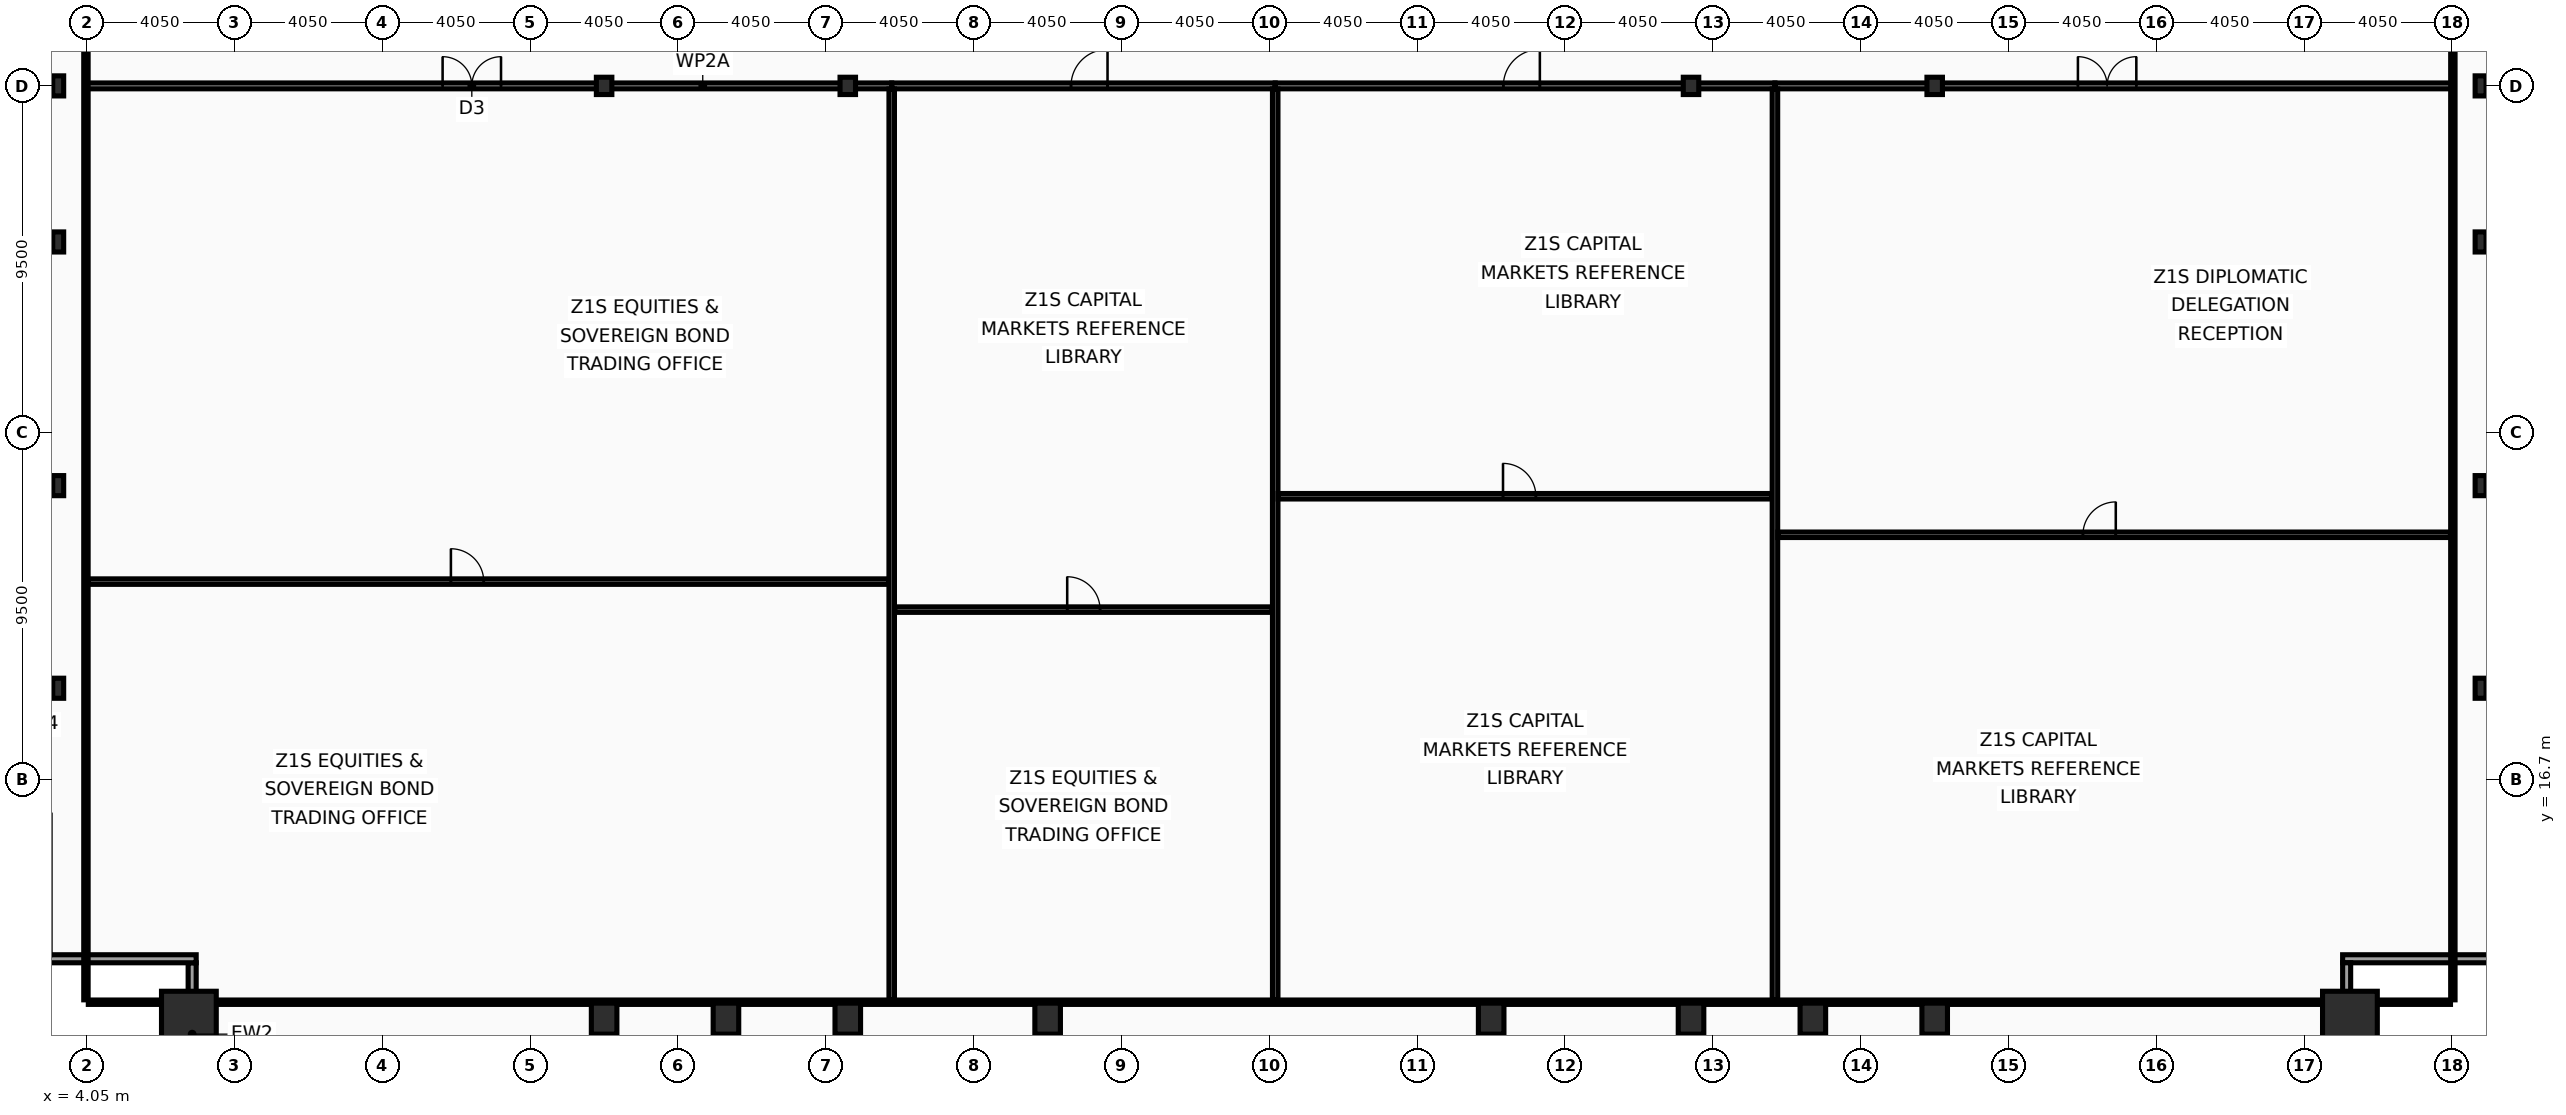
"""IFC4 building model, lengths in metres.
Left out: names, types, materials, properties, quantities, classifications, styles, units other than length and angle.
Written with IfcOpenShell. Run it as: python <this file> out.ifc"""

import sys

from ifc_helpers import new_model, si_unit, direction, frame, frame_2d, origin, origin_2d, place, context, subcontext, project, spatial, rectangle, hollow_rectangle, i_section, extrude, element, fill, save


model = new_model("IFC4")
c1 = context("Model", 3, precision=1e-05, world=origin(), true_north=direction((0.0, 1.0)))
c2 = subcontext(c1, "Body", "Model", "MODEL_VIEW")
j1 = project(units=[si_unit("LENGTHUNIT", "METRE"), si_unit("PLANEANGLEUNIT", "RADIAN")], contexts=[c1])
p1 = place(None, origin())
s1 = spatial("IfcSite", under=j1, at=p1, CompositionType="ELEMENT")
p2 = place(p1, origin())
s2 = spatial("IfcBuilding", under=s1, at=p2, CompositionType="ELEMENT")
p3 = place(p2, frame((0.0, 0.0, 90.6)))
s3 = spatial("IfcBuildingStorey", under=s2, at=p3, CompositionType="ELEMENT", Elevation=90.6)
for number, where, z_axis, x_axis in (
    (1, (6.85, 10.15, 0.0), (0.0, 0.0, 1.0), (1.0, 0.0, 0.0)),
    (2, (66.05, 10.15, 0.0), (0.0, 0.0, 1.0), (1.0, 0.0, 0.0)),
):
    element("IfcColumn", number, at=place(p3, frame(where, z_axis=z_axis, x_axis=x_axis)), inside=s3, PredefinedType="COLUMN", context=c2, shape_type="SweptSolid", body=[
        extrude(hollow_rectangle(XDim=1.5, YDim=1.5, WallThickness=0.07, at=origin_2d()), origin(), (0.0, 0.0, 1.0), 4.0),
    ])
for number, where, z_axis, x_axis in (
    (3, (18.225, 10.15, 0.0), (0.0, 0.0, 1.0), (1.0, 0.0, 0.0)),
    (4, (21.562, 10.15, 0.0), (0.0, 0.0, 1.0), (1.0, 0.0, 0.0)),
    (5, (24.9, 10.15, 0.0), (0.0, 0.0, 1.0), (1.0, 0.0, 0.0)),
    (6, (30.375, 10.15, 0.0), (0.0, 0.0, 1.0), (1.0, 0.0, 0.0)),
    (7, (42.525, 10.15, 0.0), (0.0, 0.0, 1.0), (1.0, 0.0, 0.0)),
    (8, (48.0, 10.15, 0.0), (0.0, 0.0, 1.0), (1.0, 0.0, 0.0)),
    (9, (51.337, 10.15, 0.0), (0.0, 0.0, 1.0), (1.0, 0.0, 0.0)),
    (10, (54.675, 10.15, 0.0), (0.0, 0.0, 1.0), (1.0, 0.0, 0.0)),
):
    element("IfcColumn", number, at=place(p3, frame(where, z_axis=z_axis, x_axis=x_axis)), inside=s3, PredefinedType="COLUMN", context=c2, shape_type="SweptSolid", body=[
        extrude(hollow_rectangle(XDim=0.7, YDim=0.85, WallThickness=0.05, at=origin_2d()), origin(), (0.0, 0.0, 1.0), 4.0),
    ])
for number, where, z_axis, x_axis in (
    (11, (3.27, 19.2, 0.0), (0.0, 0.0, 1.0), (1.0, 0.0, 0.0)),
    (12, (3.27, 24.75, 0.0), (0.0, 0.0, 1.0), (1.0, 0.0, 0.0)),
    (13, (3.27, 31.425, 0.0), (0.0, 0.0, 1.0), (1.0, 0.0, 0.0)),
    (14, (3.27, 35.7, 0.0), (0.0, 0.0, 1.0), (1.0, 0.0, 0.0)),
    (15, (69.63, 19.2, 0.0), (0.0, 0.0, 1.0), (1.0, 0.0, 0.0)),
    (16, (69.63, 24.75, 0.0), (0.0, 0.0, 1.0), (1.0, 0.0, 0.0)),
    (17, (69.63, 31.425, 0.0), (0.0, 0.0, 1.0), (1.0, 0.0, 0.0)),
    (18, (69.63, 35.7, 0.0), (0.0, 0.0, 1.0), (1.0, 0.0, 0.0)),
):
    element("IfcColumn", number, at=place(p3, frame(where, z_axis=z_axis, x_axis=x_axis)), inside=s3, PredefinedType="COLUMN", context=c2, shape_type="SweptSolid", body=[
        extrude(i_section(OverallWidth=0.3, OverallDepth=0.55, WebThickness=0.015, FlangeThickness=0.029, at=origin_2d()), origin(), (0.0, 0.0, 1.0), 4.0),
    ])
for number, where, z_axis, x_axis in (
    (19, (18.225, 35.7, 0.0), (0.0, 0.0, 1.0), (1.0, 0.0, 0.0)),
    (20, (24.9, 35.7, 0.0), (0.0, 0.0, 1.0), (1.0, 0.0, 0.0)),
    (21, (48.0, 35.7, 0.0), (0.0, 0.0, 1.0), (1.0, 0.0, 0.0)),
    (22, (54.675, 35.7, 0.0), (0.0, 0.0, 1.0), (1.0, 0.0, 0.0)),
):
    element("IfcColumn", number, at=place(p3, frame(where, z_axis=z_axis, x_axis=x_axis)), inside=s3, PredefinedType="COLUMN", context=c2, shape_type="SweptSolid", body=[
        extrude(i_section(OverallWidth=0.424, OverallDepth=0.474, WebThickness=0.048, FlangeThickness=0.077, at=origin_2d()), origin(), (0.0, 0.0, 1.0), 4.0),
    ])
p4 = place(p3, frame((6.94, 7.77, 0.0), z_axis=(0.0, 0.0, 1.0), x_axis=(0.0, 1.0, 0.0)))
e23 = element("IfcWall", 23, at=p4, inside=s3, PredefinedType="SOLIDWALL", context=c2, shape_type="SweptSolid", body=[
    extrude(rectangle(XDim=3.91, YDim=0.22, at=frame_2d((1.955, 0.0))), origin(), (0.0, 0.0, 1.0), 3.16),
])
for number, where, z_axis, x_axis in (
    (24, (7.05, 11.79, 0.0), (0.0, 0.0, 1.0), (-1.0, 0.0, 0.0)),
    (25, (70.07, 11.79, 0.0), (0.0, 0.0, 1.0), (-1.0, 0.0, 0.0)),
):
    element("IfcWall", number, at=place(p3, frame(where, z_axis=z_axis, x_axis=x_axis)), inside=s3, PredefinedType="SOLIDWALL", context=c2, shape_type="SweptSolid", body=[
        extrude(rectangle(XDim=4.22, YDim=0.22, at=frame_2d((2.11, 0.0))), origin(), (0.0, 0.0, 1.0), 3.16),
    ])
p5 = place(p3, frame((65.96, 11.68, 0.0), z_axis=(0.0, 0.0, 1.0), x_axis=(0.0, -1.0, 0.0)))
e26 = element("IfcWall", 26, at=p5, inside=s3, PredefinedType="SOLIDWALL", context=c2, shape_type="SweptSolid", body=[
    extrude(rectangle(XDim=3.91, YDim=0.22, at=frame_2d((1.955, 0.0))), origin(), (0.0, 0.0, 1.0), 3.16),
])
p6 = place(p3, frame((4.03, 35.7, 0.0), z_axis=(0.0, 0.0, 1.0), x_axis=(1.0, 0.0, 0.0)))
e27 = element("IfcWall", 27, at=p6, inside=s3, PredefinedType="PARTITIONING", context=c2, shape_type="SweptSolid", body=[
    extrude(rectangle(XDim=22.073, YDim=0.16, at=frame_2d((11.037, 0.0))), origin(), (0.0, 0.0, 1.0), 3.01),
])
p7 = place(p6, frame((9.771, 0.0, 0.0)))
e28 = element("IfcOpeningElement", 28, at=p7, cuts=e27, PredefinedType="OPENING", context=c2, shape_type="SweptSolid", body=[
    extrude(rectangle(XDim=1.6, YDim=2.15, at=frame_2d((0.8, 1.075))), frame((0.0, 0.09, 0.0), z_axis=(0.0, -1.0, 0.0), x_axis=(1.0, 0.0, 0.0)), (0.0, 0.0, 1.0), 0.18),
])
p8 = place(p3, frame((4.095, 22.121, 0.0), z_axis=(0.0, 0.0, 1.0), x_axis=(1.0, 0.0, 0.0)))
e29 = element("IfcWall", 29, at=p8, inside=s3, PredefinedType="PARTITIONING", context=c2, shape_type="SweptSolid", body=[
    extrude(rectangle(XDim=21.928, YDim=0.15, at=frame_2d((10.964, 0.0))), origin(), (0.0, 0.0, 1.0), 3.01),
])
p9 = place(p8, frame((9.933, 0.0, 0.0)))
e30 = element("IfcOpeningElement", 30, at=p9, cuts=e29, PredefinedType="OPENING", context=c2, shape_type="SweptSolid", body=[
    extrude(rectangle(XDim=0.9, YDim=2.05, at=frame_2d((0.45, 1.025))), frame((0.0, 0.085, 0.0), z_axis=(0.0, -1.0, 0.0), x_axis=(1.0, 0.0, 0.0)), (0.0, 0.0, 1.0), 0.17),
])
p10 = place(p3, frame((26.103, 35.7, 0.0), z_axis=(0.0, 0.0, 1.0), x_axis=(1.0, 0.0, 0.0)))
e31 = element("IfcWall", 31, at=p10, inside=s3, PredefinedType="PARTITIONING", context=c2, shape_type="SweptSolid", body=[
    extrude(rectangle(XDim=10.506, YDim=0.16, at=frame_2d((5.253, 0.0))), origin(), (0.0, 0.0, 1.0), 3.01),
])
p11 = place(p10, frame((4.913, 0.0, 0.0)))
e32 = element("IfcOpeningElement", 32, at=p11, cuts=e31, PredefinedType="OPENING", context=c2, shape_type="SweptSolid", body=[
    extrude(rectangle(XDim=1.0, YDim=2.05, at=frame_2d((0.5, 1.025))), frame((0.0, 0.09, 0.0), z_axis=(0.0, -1.0, 0.0), x_axis=(1.0, 0.0, 0.0)), (0.0, 0.0, 1.0), 0.18),
])
p12 = place(p3, frame((26.103, 10.665, 0.0), z_axis=(0.0, 0.0, 1.0), x_axis=(0.0, 1.0, 0.0)))
e33 = element("IfcWall", 33, at=p12, inside=s3, PredefinedType="PARTITIONING", context=c2, shape_type="SweptSolid", body=[
    extrude(rectangle(XDim=24.95, YDim=0.15, at=frame_2d((12.475, 0.0))), origin(), (0.0, 0.0, 1.0), 3.26),
])
p13 = place(p3, frame((26.183, 21.354, 0.0), z_axis=(0.0, 0.0, 1.0), x_axis=(1.0, 0.0, 0.0)))
e34 = element("IfcWall", 34, at=p13, inside=s3, PredefinedType="PARTITIONING", context=c2, shape_type="SweptSolid", body=[
    extrude(rectangle(XDim=10.346, YDim=0.15, at=frame_2d((5.173, 0.0))), origin(), (0.0, 0.0, 1.0), 3.01),
])
p14 = place(p13, frame((4.728, 0.0, 0.0)))
e35 = element("IfcOpeningElement", 35, at=p14, cuts=e34, PredefinedType="OPENING", context=c2, shape_type="SweptSolid", body=[
    extrude(rectangle(XDim=0.9, YDim=2.05, at=frame_2d((0.45, 1.025))), frame((0.0, 0.085, 0.0), z_axis=(0.0, -1.0, 0.0), x_axis=(1.0, 0.0, 0.0)), (0.0, 0.0, 1.0), 0.17),
])
p15 = place(p3, frame((36.609, 35.7, 0.0), z_axis=(0.0, 0.0, 1.0), x_axis=(1.0, 0.0, 0.0)))
e36 = element("IfcWall", 36, at=p15, inside=s3, PredefinedType="PARTITIONING", context=c2, shape_type="SweptSolid", body=[
    extrude(rectangle(XDim=13.69, YDim=0.16, at=frame_2d((6.845, 0.0))), origin(), (0.0, 0.0, 1.0), 3.01),
])
p16 = place(p15, frame((6.25, 0.0, 0.0)))
e37 = element("IfcOpeningElement", 37, at=p16, cuts=e36, PredefinedType="OPENING", context=c2, shape_type="SweptSolid", body=[
    extrude(rectangle(XDim=1.0, YDim=2.05, at=frame_2d((0.5, 1.025))), frame((0.0, 0.09, 0.0), z_axis=(0.0, -1.0, 0.0), x_axis=(1.0, 0.0, 0.0)), (0.0, 0.0, 1.0), 0.18),
])
p17 = place(p3, frame((36.609, 10.665, 0.0), z_axis=(0.0, 0.0, 1.0), x_axis=(0.0, 1.0, 0.0)))
e38 = element("IfcWall", 38, at=p17, inside=s3, PredefinedType="PARTITIONING", context=c2, shape_type="SweptSolid", body=[
    extrude(rectangle(XDim=24.95, YDim=0.15, at=frame_2d((12.475, 0.0))), origin(), (0.0, 0.0, 1.0), 3.26),
])
p18 = place(p3, frame((36.689, 24.459, 0.0), z_axis=(0.0, 0.0, 1.0), x_axis=(1.0, 0.0, 0.0)))
e39 = element("IfcWall", 39, at=p18, inside=s3, PredefinedType="PARTITIONING", context=c2, shape_type="SweptSolid", body=[
    extrude(rectangle(XDim=13.53, YDim=0.15, at=frame_2d((6.765, 0.0))), origin(), (0.0, 0.0, 1.0), 3.01),
])
p19 = place(p18, frame((6.16, 0.0, 0.0)))
e40 = element("IfcOpeningElement", 40, at=p19, cuts=e39, PredefinedType="OPENING", context=c2, shape_type="SweptSolid", body=[
    extrude(rectangle(XDim=0.9, YDim=2.05, at=frame_2d((0.45, 1.025))), frame((0.0, 0.085, 0.0), z_axis=(0.0, -1.0, 0.0), x_axis=(1.0, 0.0, 0.0)), (0.0, 0.0, 1.0), 0.17),
])
p20 = place(p3, frame((50.299, 35.7, 0.0), z_axis=(0.0, 0.0, 1.0), x_axis=(1.0, 0.0, 0.0)))
e41 = element("IfcWall", 41, at=p20, inside=s3, PredefinedType="PARTITIONING", context=c2, shape_type="SweptSolid", body=[
    extrude(rectangle(XDim=18.571, YDim=0.16, at=frame_2d((9.286, 0.0))), origin(), (0.0, 0.0, 1.0), 3.01),
])
p21 = place(p20, frame((8.3, 0.0, 0.0)))
e42 = element("IfcOpeningElement", 42, at=p21, cuts=e41, PredefinedType="OPENING", context=c2, shape_type="SweptSolid", body=[
    extrude(rectangle(XDim=1.6, YDim=2.15, at=frame_2d((0.8, 1.075))), frame((0.0, 0.09, 0.0), z_axis=(0.0, -1.0, 0.0), x_axis=(1.0, 0.0, 0.0)), (0.0, 0.0, 1.0), 0.18),
])
p22 = place(p3, frame((50.299, 10.665, 0.0), z_axis=(0.0, 0.0, 1.0), x_axis=(0.0, 1.0, 0.0)))
e43 = element("IfcWall", 43, at=p22, inside=s3, PredefinedType="PARTITIONING", context=c2, shape_type="SweptSolid", body=[
    extrude(rectangle(XDim=24.95, YDim=0.15, at=frame_2d((12.475, 0.0))), origin(), (0.0, 0.0, 1.0), 3.26),
])
p23 = place(p3, frame((50.379, 23.404, 0.0), z_axis=(0.0, 0.0, 1.0), x_axis=(1.0, 0.0, 0.0)))
e44 = element("IfcWall", 44, at=p23, inside=s3, PredefinedType="PARTITIONING", context=c2, shape_type="SweptSolid", body=[
    extrude(rectangle(XDim=18.426, YDim=0.15, at=frame_2d((9.213, 0.0))), origin(), (0.0, 0.0, 1.0), 3.01),
])
p24 = place(p23, frame((8.357, 0.0, 0.0)))
e45 = element("IfcOpeningElement", 45, at=p24, cuts=e44, PredefinedType="OPENING", context=c2, shape_type="SweptSolid", body=[
    extrude(rectangle(XDim=0.9, YDim=2.05, at=frame_2d((0.45, 1.025))), frame((0.0, 0.085, 0.0), z_axis=(0.0, -1.0, 0.0), x_axis=(1.0, 0.0, 0.0)), (0.0, 0.0, 1.0), 0.17),
])
for number, where, z_axis, x_axis in (
    (46, (4.03, 10.665, 0.0), (0.0, 0.0, 1.0), (0.0, 1.0, 0.0)),
    (47, (68.87, 10.665, 0.0), (0.0, 0.0, 1.0), (0.0, 1.0, 0.0)),
):
    element("IfcWall", number, at=place(p3, frame(where, z_axis=z_axis, x_axis=x_axis)), inside=s3, PredefinedType="PARTITIONING", context=c2, shape_type="SweptSolid", body=[
        extrude(rectangle(XDim=42.11, YDim=0.12, at=frame_2d((21.055, 0.0))), origin(), (0.0, 0.0, 1.0), 3.01),
    ])
p25 = place(p3, frame((4.095, 10.6, 0.0), z_axis=(0.0, 0.0, 1.0), x_axis=(1.0, 0.0, 0.0)))
e48 = element("IfcWall", 48, at=p25, inside=s3, PredefinedType="PARTITIONING", context=c2, shape_type="SweptSolid", body=[
    extrude(rectangle(XDim=64.71, YDim=0.12, at=frame_2d((32.355, 0.0))), origin(), (0.0, 0.0, 1.0), 3.01),
])
p26 = place(p7, origin())
e49 = element("IfcDoor", 49, at=p26, inside=s3, OperationType="DOUBLE_DOOR_SINGLE_SWING", PredefinedType="DOOR", context=c2, shape_type="SweptSolid", body=[
    extrude(rectangle(XDim=1.6, YDim=2.15, at=frame_2d((0.8, 1.075))), frame((0.0, 0.025, 0.0), z_axis=(0.0, -1.0, 0.0), x_axis=(1.0, 0.0, 0.0)), (0.0, 0.0, 1.0), 0.05),
])
fill(e28, e49)
p27 = place(p9, origin())
e50 = element("IfcDoor", 50, at=p27, inside=s3, OperationType="SINGLE_SWING_LEFT", PredefinedType="DOOR", context=c2, shape_type="SweptSolid", body=[
    extrude(rectangle(XDim=0.9, YDim=2.05, at=frame_2d((0.45, 1.025))), frame((0.0, 0.025, 0.0), z_axis=(0.0, -1.0, 0.0), x_axis=(1.0, 0.0, 0.0)), (0.0, 0.0, 1.0), 0.05),
])
fill(e30, e50)
p28 = place(p11, origin())
e51 = element("IfcDoor", 51, at=p28, inside=s3, OperationType="SINGLE_SWING_RIGHT", PredefinedType="DOOR", context=c2, shape_type="SweptSolid", body=[
    extrude(rectangle(XDim=1.0, YDim=2.05, at=frame_2d((0.5, 1.025))), frame((0.0, 0.025, 0.0), z_axis=(0.0, -1.0, 0.0), x_axis=(1.0, 0.0, 0.0)), (0.0, 0.0, 1.0), 0.05),
])
fill(e32, e51)
p29 = place(p14, origin())
e52 = element("IfcDoor", 52, at=p29, inside=s3, OperationType="SINGLE_SWING_LEFT", PredefinedType="DOOR", context=c2, shape_type="SweptSolid", body=[
    extrude(rectangle(XDim=0.9, YDim=2.05, at=frame_2d((0.45, 1.025))), frame((0.0, 0.025, 0.0), z_axis=(0.0, -1.0, 0.0), x_axis=(1.0, 0.0, 0.0)), (0.0, 0.0, 1.0), 0.05),
])
fill(e35, e52)
p30 = place(p16, origin())
e53 = element("IfcDoor", 53, at=p30, inside=s3, OperationType="SINGLE_SWING_RIGHT", PredefinedType="DOOR", context=c2, shape_type="SweptSolid", body=[
    extrude(rectangle(XDim=1.0, YDim=2.05, at=frame_2d((0.5, 1.025))), frame((0.0, 0.025, 0.0), z_axis=(0.0, -1.0, 0.0), x_axis=(1.0, 0.0, 0.0)), (0.0, 0.0, 1.0), 0.05),
])
fill(e37, e53)
p31 = place(p19, origin())
e54 = element("IfcDoor", 54, at=p31, inside=s3, OperationType="SINGLE_SWING_LEFT", PredefinedType="DOOR", context=c2, shape_type="SweptSolid", body=[
    extrude(rectangle(XDim=0.9, YDim=2.05, at=frame_2d((0.45, 1.025))), frame((0.0, 0.025, 0.0), z_axis=(0.0, -1.0, 0.0), x_axis=(1.0, 0.0, 0.0)), (0.0, 0.0, 1.0), 0.05),
])
fill(e40, e54)
p32 = place(p21, origin())
e55 = element("IfcDoor", 55, at=p32, inside=s3, OperationType="DOUBLE_DOOR_SINGLE_SWING", PredefinedType="DOOR", context=c2, shape_type="SweptSolid", body=[
    extrude(rectangle(XDim=1.6, YDim=2.15, at=frame_2d((0.8, 1.075))), frame((0.0, 0.025, 0.0), z_axis=(0.0, -1.0, 0.0), x_axis=(1.0, 0.0, 0.0)), (0.0, 0.0, 1.0), 0.05),
])
fill(e42, e55)
p33 = place(p24, origin())
e56 = element("IfcDoor", 56, at=p33, inside=s3, OperationType="SINGLE_SWING_RIGHT", PredefinedType="DOOR", context=c2, shape_type="SweptSolid", body=[
    extrude(rectangle(XDim=0.9, YDim=2.05, at=frame_2d((0.45, 1.025))), frame((0.0, 0.025, 0.0), z_axis=(0.0, -1.0, 0.0), x_axis=(1.0, 0.0, 0.0)), (0.0, 0.0, 1.0), 0.05),
])
fill(e45, e56)
save(model, sys.argv[1])
